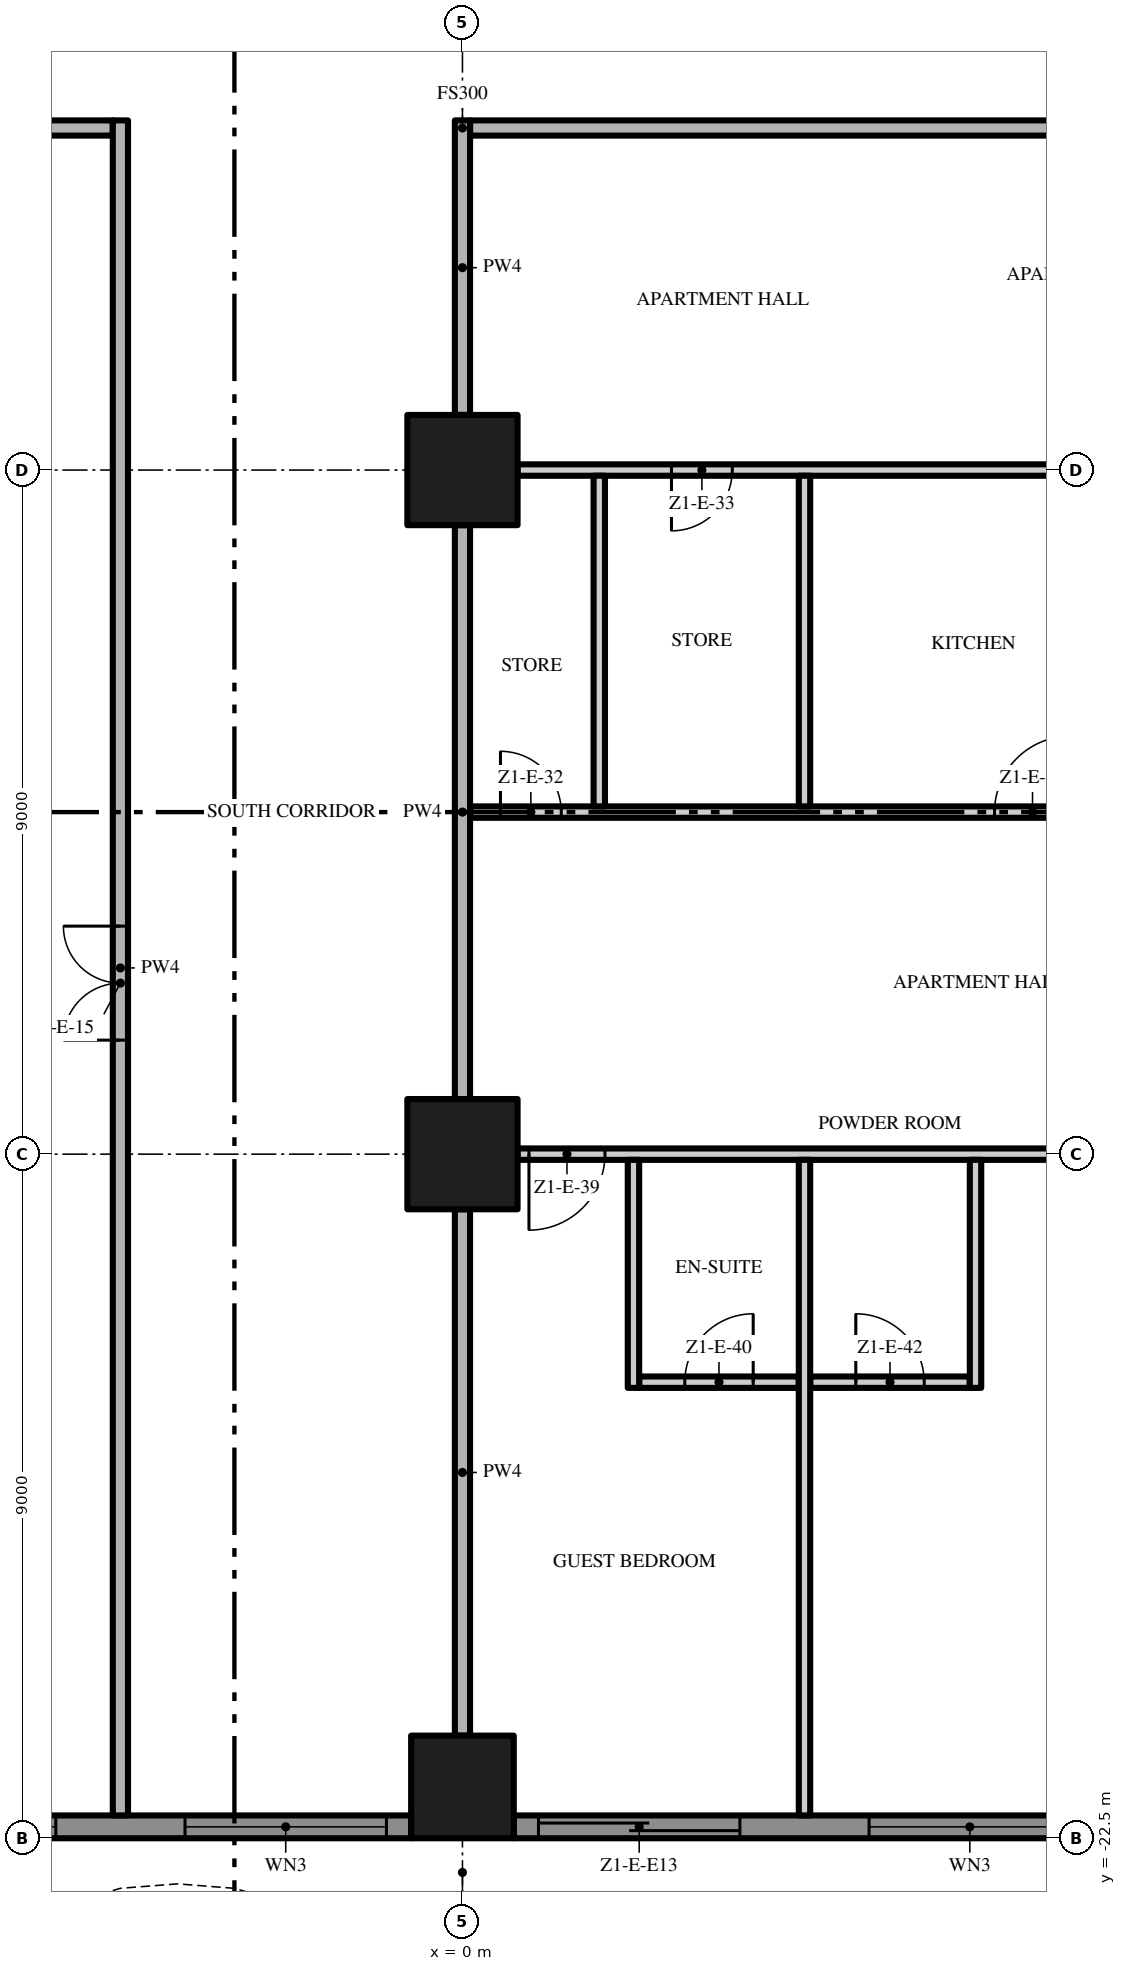
"""IFC4 building model, lengths in metres.
Left out: names, types, materials, properties, quantities, classifications, styles, units other than length and angle.
Written with IfcOpenShell. Run it as: python <this file> out.ifc"""

import sys

from ifc_helpers import new_model, si_unit, direction, frame, frame_2d, origin, origin_2d, place, context, subcontext, project, spatial, polyline, rectangle, outline, extrude, element, fill, save


model = new_model("IFC4")
c1 = context("Model", 3, precision=1e-05, world=origin(), true_north=direction((0.0, 1.0)))
c2 = subcontext(c1, "Body", "Model", "MODEL_VIEW")
j1 = project(units=[si_unit("LENGTHUNIT", "METRE"), si_unit("PLANEANGLEUNIT", "RADIAN")], contexts=[c1])
p1 = place(None, origin())
s1 = spatial("IfcSite", under=j1, at=p1, CompositionType="ELEMENT")
p2 = place(p1, origin())
s2 = spatial("IfcBuilding", under=s1, at=p2, CompositionType="ELEMENT")
p3 = place(p2, frame((0.0, 0.0, 60.6)))
s3 = spatial("IfcBuildingStorey", under=s2, at=p3, CompositionType="ELEMENT", Elevation=60.6)
p4 = place(p3, frame((0.0, -13.5, 0.0), z_axis=(0.0, 0.0, 1.0), x_axis=(1.0, 0.0, 0.0)))
e1 = element("IfcColumn", 1, at=p4, inside=s3, PredefinedType="COLUMN", context=c2, shape_type="SweptSolid", body=[
    extrude(rectangle(XDim=1.45, YDim=1.45, at=origin_2d()), origin(), (0.0, 0.0, 1.0), 3.5),
])
p5 = place(p3, frame((0.0, -21.825, 0.0), z_axis=(0.0, 0.0, 1.0), x_axis=(1.0, 0.0, 0.0)))
e2 = element("IfcColumn", 2, at=p5, inside=s3, PredefinedType="COLUMN", context=c2, shape_type="SweptSolid", body=[
    extrude(rectangle(XDim=1.35, YDim=1.35, at=origin_2d()), origin(), (0.0, 0.0, 1.0), 3.5),
])
p6 = place(p3, frame((0.0, -4.5, 0.0), z_axis=(0.0, 0.0, 1.0), x_axis=(1.0, 0.0, 0.0)))
e3 = element("IfcColumn", 3, at=p6, inside=s3, PredefinedType="COLUMN", context=c2, shape_type="SweptSolid", body=[
    extrude(rectangle(XDim=1.45, YDim=1.45, at=origin_2d()), origin(), (0.0, 0.0, 1.0), 3.5),
])
p7 = place(p3, frame((-0.675, -22.35, 0.0), z_axis=(0.0, 0.0, 1.0), x_axis=(-1.0, 0.0, 0.0)))
e4 = element("IfcWall", 4, at=p7, inside=s3, PredefinedType="SOLIDWALL", context=c2, shape_type="SweptSolid", body=[
    extrude(rectangle(XDim=7.65, YDim=0.3, at=frame_2d((3.825, 0.0))), origin(), (0.0, 0.0, 1.0), 3.5),
])
p8 = place(p7, frame((4.675, 0.0, 0.45)))
e5 = element("IfcOpeningElement", 5, at=p8, cuts=e4, PredefinedType="OPENING", context=c2, shape_type="SweptSolid", body=[
    extrude(rectangle(XDim=2.65, YDim=2.65, at=frame_2d((1.325, 1.325))), frame((0.0, 0.16, 0.0), z_axis=(0.0, -1.0, 0.0), x_axis=(1.0, 0.0, 0.0)), (0.0, 0.0, 1.0), 0.32),
])
p9 = place(p7, frame((0.325, 0.0, 0.45)))
e6 = element("IfcOpeningElement", 6, at=p9, cuts=e4, PredefinedType="OPENING", context=c2, shape_type="SweptSolid", body=[
    extrude(rectangle(XDim=2.65, YDim=2.65, at=frame_2d((1.325, 1.325))), frame((0.0, 0.16, 0.0), z_axis=(0.0, -1.0, 0.0), x_axis=(1.0, 0.0, 0.0)), (0.0, 0.0, 1.0), 0.32),
])
p10 = place(p3, frame((8.325, -22.35, 0.0), z_axis=(0.0, 0.0, 1.0), x_axis=(-1.0, 0.0, 0.0)))
e7 = element("IfcWall", 7, at=p10, inside=s3, PredefinedType="SOLIDWALL", context=c2, shape_type="SweptSolid", body=[
    extrude(rectangle(XDim=7.65, YDim=0.3, at=frame_2d((3.825, 0.0))), origin(), (0.0, 0.0, 1.0), 3.5),
])
p11 = place(p10, frame((4.675, 0.0, 0.0)))
e8 = element("IfcOpeningElement", 8, at=p11, cuts=e7, PredefinedType="OPENING", context=c2, shape_type="SweptSolid", body=[
    extrude(rectangle(XDim=2.65, YDim=2.4, at=frame_2d((1.325, 1.2))), frame((0.0, 0.16, 0.0), z_axis=(0.0, -1.0, 0.0), x_axis=(1.0, 0.0, 0.0)), (0.0, 0.0, 1.0), 0.32),
])
p12 = place(p10, frame((0.325, 0.0, 0.45)))
e9 = element("IfcOpeningElement", 9, at=p12, cuts=e7, PredefinedType="OPENING", context=c2, shape_type="SweptSolid", body=[
    extrude(rectangle(XDim=2.65, YDim=2.65, at=frame_2d((1.325, 1.325))), frame((0.0, 0.16, 0.0), z_axis=(0.0, -1.0, 0.0), x_axis=(1.0, 0.0, 0.0)), (0.0, 0.0, 1.0), 0.32),
])
p13 = place(p3, origin())
e10 = element("IfcWall", 10, at=p13, inside=s3, PredefinedType="USERDEFINED", context=c2, shape_type="SweptSolid", body=[
    extrude(outline(polyline([(-22.5, -24.3), (-21.0, -23.595), (-19.5, -23.159), (-18.75, -23.1), (-18.0, -23.159), (-16.5, -23.595), (-15.0, -24.3), (-13.5, -25.005), (-12.0, -25.441), (-11.25, -25.5), (-10.5, -25.441), (-9.0, -25.005), (-7.5, -24.3), (-6.0, -23.595), (-4.5, -23.159), (-3.75, -23.1), (-3.0, -23.159), (-1.5, -23.595), (0.0, -24.3), (1.5, -25.005), (3.0, -25.441), (3.75, -25.5), (4.5, -25.441), (6.0, -25.005), (7.5, -24.3), (9.0, -23.595), (10.5, -23.159), (11.25, -23.1), (12.0, -23.159), (13.5, -23.595), (15.0, -24.3), (16.5, -25.005), (18.0, -25.441), (18.75, -25.5), (19.5, -25.441), (21.0, -25.005), (22.5, -24.3), (22.394, -24.074), (20.911, -24.771), (19.455, -25.194), (18.75, -25.249), (18.045, -25.194), (16.589, -24.771), (15.106, -24.074), (13.589, -23.36), (12.045, -22.911), (11.25, -22.849), (10.455, -22.911), (8.911, -23.36), (7.394, -24.074), (5.911, -24.771), (4.455, -25.194), (3.75, -25.249), (3.045, -25.194), (1.589, -24.771), (0.106, -24.074), (-1.411, -23.36), (-2.955, -22.911), (-3.75, -22.849), (-4.545, -22.911), (-6.089, -23.36), (-7.606, -24.074), (-9.089, -24.771), (-10.545, -25.194), (-11.25, -25.249), (-11.955, -25.194), (-13.411, -24.771), (-14.894, -24.074), (-16.411, -23.36), (-17.955, -22.911), (-18.75, -22.849), (-19.545, -22.911), (-21.089, -23.36), (-22.606, -24.074), (-22.5, -24.3)])), origin(), (0.0, 0.0, 1.0), 0.9),
])
p14 = place(p3, frame((2.325, -16.5, 0.0), z_axis=(0.0, 0.0, 1.0), x_axis=(1.0, 0.0, 0.0)))
e11 = element("IfcWall", 11, at=p14, inside=s3, PredefinedType="PARTITIONING", context=c2, shape_type="SweptSolid", body=[
    extrude(rectangle(XDim=2.1, YDim=0.15, at=frame_2d((1.05, 0.0))), origin(), (0.0, 0.0, 1.0), 3.5),
])
p15 = place(p14, frame((0.6, 0.0, 0.0)))
e12 = element("IfcOpeningElement", 12, at=p15, cuts=e11, PredefinedType="OPENING", context=c2, shape_type="SweptSolid", body=[
    extrude(rectangle(XDim=0.9, YDim=2.1, at=frame_2d((0.45, 1.05))), frame((0.0, 0.085, 0.0), z_axis=(0.0, -1.0, 0.0), x_axis=(1.0, 0.0, 0.0)), (0.0, 0.0, 1.0), 0.17),
])
p16 = place(p3, frame((4.575, -16.5, 0.0), z_axis=(0.0, 0.0, 1.0), x_axis=(1.0, 0.0, 0.0)))
e13 = element("IfcWall", 13, at=p16, inside=s3, PredefinedType="PARTITIONING", context=c2, shape_type="SweptSolid", body=[
    extrude(rectangle(XDim=2.1, YDim=0.15, at=frame_2d((1.05, 0.0))), origin(), (0.0, 0.0, 1.0), 3.5),
])
p17 = place(p16, frame((0.6, 0.0, 0.0)))
e14 = element("IfcOpeningElement", 14, at=p17, cuts=e13, PredefinedType="OPENING", context=c2, shape_type="SweptSolid", body=[
    extrude(rectangle(XDim=0.9, YDim=2.1, at=frame_2d((0.45, 1.05))), frame((0.0, 0.085, 0.0), z_axis=(0.0, -1.0, 0.0), x_axis=(1.0, 0.0, 0.0)), (0.0, 0.0, 1.0), 0.17),
])
p18 = place(p3, frame((8.275, -13.5, 0.0), z_axis=(0.0, 0.0, 1.0), x_axis=(-1.0, 0.0, 0.0)))
e15 = element("IfcWall", 15, at=p18, inside=s3, PredefinedType="PARTITIONING", context=c2, shape_type="SweptSolid", body=[
    extrude(rectangle(XDim=7.55, YDim=0.15, at=frame_2d((3.775, 0.0))), origin(), (0.0, 0.0, 1.0), 3.5),
])
p19 = place(p18, frame((6.4, 0.0, 0.0)))
e16 = element("IfcOpeningElement", 16, at=p19, cuts=e15, PredefinedType="OPENING", context=c2, shape_type="SweptSolid", body=[
    extrude(rectangle(XDim=1.0, YDim=2.4, at=frame_2d((0.5, 1.2))), frame((0.0, 0.085, 0.0), z_axis=(0.0, -1.0, 0.0), x_axis=(1.0, 0.0, 0.0)), (0.0, 0.0, 1.0), 0.17),
])
p20 = place(p3, frame((0.1, -9.0, 0.0), z_axis=(0.0, 0.0, 1.0), x_axis=(1.0, 0.0, 0.0)))
e17 = element("IfcWall", 17, at=p20, inside=s3, PredefinedType="PARTITIONING", context=c2, shape_type="SweptSolid", body=[
    extrude(rectangle(XDim=13.4, YDim=0.15, at=frame_2d((6.7, 0.0))), origin(), (0.0, 0.0, 1.0), 3.5),
])
p21 = place(p20, frame((0.4, 0.0, 0.0)))
e18 = element("IfcOpeningElement", 18, at=p21, cuts=e17, PredefinedType="OPENING", context=c2, shape_type="SweptSolid", body=[
    extrude(rectangle(XDim=0.8, YDim=2.0, at=frame_2d((0.4, 1.0))), frame((0.0, 0.085, 0.0), z_axis=(0.0, -1.0, 0.0), x_axis=(1.0, 0.0, 0.0)), (0.0, 0.0, 1.0), 0.17),
])
p22 = place(p20, frame((6.9, 0.0, 0.0)))
e19 = element("IfcOpeningElement", 19, at=p22, cuts=e17, PredefinedType="OPENING", context=c2, shape_type="SweptSolid", body=[
    extrude(rectangle(XDim=1.0, YDim=2.4, at=frame_2d((0.5, 1.2))), frame((0.0, 0.085, 0.0), z_axis=(0.0, -1.0, 0.0), x_axis=(1.0, 0.0, 0.0)), (0.0, 0.0, 1.0), 0.17),
])
p23 = place(p3, frame((8.275, -4.5, 0.0), z_axis=(0.0, 0.0, 1.0), x_axis=(-1.0, 0.0, 0.0)))
e20 = element("IfcWall", 20, at=p23, inside=s3, PredefinedType="PARTITIONING", context=c2, shape_type="SweptSolid", body=[
    extrude(rectangle(XDim=7.55, YDim=0.15, at=frame_2d((3.775, 0.0))), origin(), (0.0, 0.0, 1.0), 3.5),
])
p24 = place(p23, frame((4.725, 0.0, 0.0)))
e21 = element("IfcOpeningElement", 21, at=p24, cuts=e20, PredefinedType="OPENING", context=c2, shape_type="SweptSolid", body=[
    extrude(rectangle(XDim=0.8, YDim=2.0, at=frame_2d((0.4, 1.0))), frame((0.0, 0.085, 0.0), z_axis=(0.0, -1.0, 0.0), x_axis=(1.0, 0.0, 0.0)), (0.0, 0.0, 1.0), 0.17),
])
p25 = place(p3, frame((-17.4, 0.0, 0.0), z_axis=(0.0, 0.0, 1.0), x_axis=(1.0, 0.0, 0.0)))
e22 = element("IfcWall", 22, at=p25, inside=s3, PredefinedType="PARTITIONING", context=c2, shape_type="SweptSolid", body=[
    extrude(rectangle(XDim=12.8, YDim=0.2, at=frame_2d((6.4, 0.0))), origin(), (0.0, 0.0, 1.0), 3.5),
])
p26 = place(p3, frame((17.4, 0.0, 0.0), z_axis=(0.0, 0.0, 1.0), x_axis=(-1.0, 0.0, 0.0)))
e23 = element("IfcWall", 23, at=p26, inside=s3, PredefinedType="PARTITIONING", context=c2, shape_type="SweptSolid", body=[
    extrude(rectangle(XDim=17.3, YDim=0.2, at=frame_2d((8.65, 0.0))), origin(), (0.0, 0.0, 1.0), 3.5),
])
p27 = place(p26, frame((7.65, 0.0, 0.0)))
e24 = element("IfcOpeningElement", 24, at=p27, cuts=e23, PredefinedType="OPENING", context=c2, shape_type="SweptSolid", body=[
    extrude(rectangle(XDim=1.5, YDim=2.4, at=frame_2d((0.75, 1.2))), frame((0.0, 0.11, 0.0), z_axis=(0.0, -1.0, 0.0), x_axis=(1.0, 0.0, 0.0)), (0.0, 0.0, 1.0), 0.22),
])
p28 = place(p3, frame((-4.5, -22.2, 0.0), z_axis=(0.0, 0.0, 1.0), x_axis=(0.0, 1.0, 0.0)))
e25 = element("IfcWall", 25, at=p28, inside=s3, PredefinedType="PARTITIONING", context=c2, shape_type="SweptSolid", body=[
    extrude(rectangle(XDim=22.3, YDim=0.2, at=frame_2d((11.15, 0.0))), origin(), (0.0, 0.0, 1.0), 3.5),
])
p29 = place(p28, frame((10.2, 0.0, 0.0)))
e26 = element("IfcOpeningElement", 26, at=p29, cuts=e25, PredefinedType="OPENING", context=c2, shape_type="SweptSolid", body=[
    extrude(rectangle(XDim=1.5, YDim=2.4, at=frame_2d((0.75, 1.2))), frame((0.0, 0.11, 0.0), z_axis=(0.0, -1.0, 0.0), x_axis=(1.0, 0.0, 0.0)), (0.0, 0.0, 1.0), 0.22),
])
p30 = place(p3, frame((0.0, -21.15, 0.0), z_axis=(0.0, 0.0, 1.0), x_axis=(0.0, 1.0, 0.0)))
e27 = element("IfcWall", 27, at=p30, inside=s3, PredefinedType="PARTITIONING", context=c2, shape_type="SweptSolid", body=[
    extrude(rectangle(XDim=6.925, YDim=0.2, at=frame_2d((3.462, 0.0))), origin(), (0.0, 0.0, 1.0), 3.5),
])
p31 = place(p3, frame((0.0, -12.775, 0.0), z_axis=(0.0, 0.0, 1.0), x_axis=(0.0, 1.0, 0.0)))
e28 = element("IfcWall", 28, at=p31, inside=s3, PredefinedType="PARTITIONING", context=c2, shape_type="SweptSolid", body=[
    extrude(rectangle(XDim=7.55, YDim=0.2, at=frame_2d((3.775, 0.0))), origin(), (0.0, 0.0, 1.0), 3.5),
])
p32 = place(p3, frame((0.0, -3.775, 0.0), z_axis=(0.0, 0.0, 1.0), x_axis=(0.0, 1.0, 0.0)))
e29 = element("IfcWall", 29, at=p32, inside=s3, PredefinedType="PARTITIONING", context=c2, shape_type="SweptSolid", body=[
    extrude(rectangle(XDim=3.875, YDim=0.2, at=frame_2d((1.938, 0.0))), origin(), (0.0, 0.0, 1.0), 3.5),
])
p33 = place(p3, frame((1.8, -8.925, 0.0), z_axis=(0.0, 0.0, 1.0), x_axis=(0.0, 1.0, 0.0)))
e30 = element("IfcWall", 30, at=p33, inside=s3, PredefinedType="PARTITIONING", context=c2, shape_type="SweptSolid", body=[
    extrude(rectangle(XDim=4.35, YDim=0.15, at=frame_2d((2.175, 0.0))), origin(), (0.0, 0.0, 1.0), 3.5),
])
p34 = place(p3, frame((2.25, -16.575, 0.0), z_axis=(0.0, 0.0, 1.0), x_axis=(0.0, 1.0, 0.0)))
e31 = element("IfcWall", 31, at=p34, inside=s3, PredefinedType="PARTITIONING", context=c2, shape_type="SweptSolid", body=[
    extrude(rectangle(XDim=3.0, YDim=0.15, at=frame_2d((1.5, 0.0))), origin(), (0.0, 0.0, 1.0), 3.5),
])
p35 = place(p3, frame((4.5, -22.2, 0.0), z_axis=(0.0, 0.0, 1.0), x_axis=(0.0, 1.0, 0.0)))
e32 = element("IfcWall", 32, at=p35, inside=s3, PredefinedType="PARTITIONING", context=c2, shape_type="SweptSolid", body=[
    extrude(rectangle(XDim=8.625, YDim=0.15, at=frame_2d((4.312, 0.0))), origin(), (0.0, 0.0, 1.0), 3.5),
])
p36 = place(p3, frame((4.5, -8.925, 0.0), z_axis=(0.0, 0.0, 1.0), x_axis=(0.0, 1.0, 0.0)))
e33 = element("IfcWall", 33, at=p36, inside=s3, PredefinedType="PARTITIONING", context=c2, shape_type="SweptSolid", body=[
    extrude(rectangle(XDim=4.35, YDim=0.15, at=frame_2d((2.175, 0.0))), origin(), (0.0, 0.0, 1.0), 3.5),
])
p37 = place(p3, frame((6.75, -16.575, 0.0), z_axis=(0.0, 0.0, 1.0), x_axis=(0.0, 1.0, 0.0)))
e34 = element("IfcWall", 34, at=p37, inside=s3, PredefinedType="PARTITIONING", context=c2, shape_type="SweptSolid", body=[
    extrude(rectangle(XDim=3.0, YDim=0.15, at=frame_2d((1.5, 0.0))), origin(), (0.0, 0.0, 1.0), 3.5),
])
p38 = place(p8, origin())
e35 = element("IfcWindow", 35, at=p38, inside=s3, PartitioningType="SINGLE_PANEL", PredefinedType="WINDOW", context=c2, shape_type="SweptSolid", body=[
    extrude(rectangle(XDim=2.65, YDim=2.65, at=frame_2d((1.325, 1.325))), frame((0.0, 0.03, 0.0), z_axis=(0.0, -1.0, 0.0), x_axis=(1.0, 0.0, 0.0)), (0.0, 0.0, 1.0), 0.06),
])
fill(e5, e35)
p39 = place(p9, origin())
e36 = element("IfcWindow", 36, at=p39, inside=s3, PartitioningType="SINGLE_PANEL", PredefinedType="WINDOW", context=c2, shape_type="SweptSolid", body=[
    extrude(rectangle(XDim=2.65, YDim=2.65, at=frame_2d((1.325, 1.325))), frame((0.0, 0.03, 0.0), z_axis=(0.0, -1.0, 0.0), x_axis=(1.0, 0.0, 0.0)), (0.0, 0.0, 1.0), 0.06),
])
fill(e6, e36)
p40 = place(p11, origin())
e37 = element("IfcDoor", 37, at=p40, inside=s3, OperationType="SINGLE_SWING_LEFT", PredefinedType="DOOR", context=c2, shape_type="SweptSolid", body=[
    extrude(rectangle(XDim=2.65, YDim=2.4, at=frame_2d((1.325, 1.2))), frame((0.0, 0.025, 0.0), z_axis=(0.0, -1.0, 0.0), x_axis=(1.0, 0.0, 0.0)), (0.0, 0.0, 1.0), 0.05),
])
fill(e8, e37)
p41 = place(p12, origin())
e38 = element("IfcWindow", 38, at=p41, inside=s3, PartitioningType="SINGLE_PANEL", PredefinedType="WINDOW", context=c2, shape_type="SweptSolid", body=[
    extrude(rectangle(XDim=2.65, YDim=2.65, at=frame_2d((1.325, 1.325))), frame((0.0, 0.03, 0.0), z_axis=(0.0, -1.0, 0.0), x_axis=(1.0, 0.0, 0.0)), (0.0, 0.0, 1.0), 0.06),
])
fill(e9, e38)
p42 = place(p29, origin())
e39 = element("IfcDoor", 39, at=p42, inside=s3, OperationType="DOUBLE_DOOR_SINGLE_SWING", PredefinedType="DOOR", context=c2, shape_type="SweptSolid", body=[
    extrude(rectangle(XDim=1.5, YDim=2.4, at=frame_2d((0.75, 1.2))), frame((0.0, 0.025, 0.0), z_axis=(0.0, -1.0, 0.0), x_axis=(1.0, 0.0, 0.0)), (0.0, 0.0, 1.0), 0.05),
])
fill(e26, e39)
p43 = place(p21, origin())
e40 = element("IfcDoor", 40, at=p43, inside=s3, OperationType="SINGLE_SWING_LEFT", PredefinedType="DOOR", context=c2, shape_type="SweptSolid", body=[
    extrude(rectangle(XDim=0.8, YDim=2.0, at=frame_2d((0.4, 1.0))), frame((0.0, 0.025, 0.0), z_axis=(0.0, -1.0, 0.0), x_axis=(1.0, 0.0, 0.0)), (0.0, 0.0, 1.0), 0.05),
])
fill(e18, e40)
p44 = place(p24, origin())
e41 = element("IfcDoor", 41, at=p44, inside=s3, OperationType="SINGLE_SWING_RIGHT", PredefinedType="DOOR", context=c2, shape_type="SweptSolid", body=[
    extrude(rectangle(XDim=0.8, YDim=2.0, at=frame_2d((0.4, 1.0))), frame((0.0, 0.025, 0.0), z_axis=(0.0, -1.0, 0.0), x_axis=(1.0, 0.0, 0.0)), (0.0, 0.0, 1.0), 0.05),
])
fill(e21, e41)
p45 = place(p22, origin())
e42 = element("IfcDoor", 42, at=p45, inside=s3, OperationType="SINGLE_SWING_RIGHT", PredefinedType="DOOR", context=c2, shape_type="SweptSolid", body=[
    extrude(rectangle(XDim=1.0, YDim=2.4, at=frame_2d((0.5, 1.2))), frame((0.0, 0.025, 0.0), z_axis=(0.0, -1.0, 0.0), x_axis=(1.0, 0.0, 0.0)), (0.0, 0.0, 1.0), 0.05),
])
fill(e19, e42)
p46 = place(p19, origin())
e43 = element("IfcDoor", 43, at=p46, inside=s3, OperationType="SINGLE_SWING_RIGHT", PredefinedType="DOOR", context=c2, shape_type="SweptSolid", body=[
    extrude(rectangle(XDim=1.0, YDim=2.4, at=frame_2d((0.5, 1.2))), frame((0.0, 0.025, 0.0), z_axis=(0.0, -1.0, 0.0), x_axis=(1.0, 0.0, 0.0)), (0.0, 0.0, 1.0), 0.05),
])
fill(e16, e43)
p47 = place(p15, origin())
e44 = element("IfcDoor", 44, at=p47, inside=s3, OperationType="SINGLE_SWING_RIGHT", PredefinedType="DOOR", context=c2, shape_type="SweptSolid", body=[
    extrude(rectangle(XDim=0.9, YDim=2.1, at=frame_2d((0.45, 1.05))), frame((0.0, 0.025, 0.0), z_axis=(0.0, -1.0, 0.0), x_axis=(1.0, 0.0, 0.0)), (0.0, 0.0, 1.0), 0.05),
])
fill(e12, e44)
p48 = place(p17, origin())
e45 = element("IfcDoor", 45, at=p48, inside=s3, OperationType="SINGLE_SWING_LEFT", PredefinedType="DOOR", context=c2, shape_type="SweptSolid", body=[
    extrude(rectangle(XDim=0.9, YDim=2.1, at=frame_2d((0.45, 1.05))), frame((0.0, 0.025, 0.0), z_axis=(0.0, -1.0, 0.0), x_axis=(1.0, 0.0, 0.0)), (0.0, 0.0, 1.0), 0.05),
])
fill(e14, e45)
save(model, sys.argv[1])
